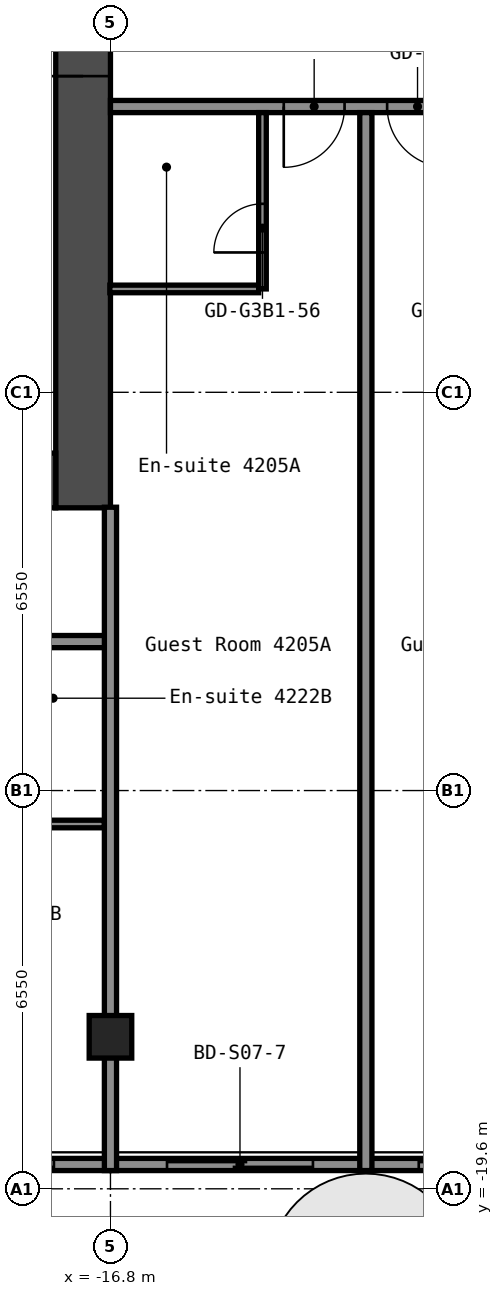
"""IFC4 building model, lengths in metres.
Left out: names, types, materials, properties, quantities, classifications, styles, units other than length and angle.
Written with IfcOpenShell. Run it as: python <this file> out.ifc"""

import sys

from ifc_helpers import new_model, si_unit, direction, frame, frame_2d, origin, origin_2d, place, context, subcontext, project, spatial, rectangle, hollow_rectangle, extrude, element, fill, save


model = new_model("IFC4")
c1 = context("Model", 3, precision=1e-05, world=origin(), true_north=direction((0.0, 1.0)))
c2 = subcontext(c1, "Body", "Model", "MODEL_VIEW")
j1 = project(units=[si_unit("LENGTHUNIT", "METRE"), si_unit("PLANEANGLEUNIT", "RADIAN")], contexts=[c1])
p1 = place(None, origin())
s1 = spatial("IfcSite", under=j1, at=p1, CompositionType="ELEMENT")
p2 = place(p1, origin())
s2 = spatial("IfcBuilding", under=s1, at=p2, CompositionType="ELEMENT")
p3 = place(p2, frame((0.0, 0.0, 150.2)))
s3 = spatial("IfcBuildingStorey", under=s2, at=p3, CompositionType="ELEMENT", Elevation=150.2)
p4 = place(p3, frame((-16.8, -17.1, 0.0), z_axis=(0.0, 0.0, 1.0), x_axis=(1.0, 0.0, 0.0)))
e1 = element("IfcColumn", 1, at=p4, inside=s3, PredefinedType="COLUMN", context=c2, shape_type="SweptSolid", body=[
    extrude(hollow_rectangle(XDim=0.7, YDim=0.7, WallThickness=0.028, at=origin_2d()), origin(), (0.0, 0.0, 1.0), 2.75),
])
p5 = place(p3, frame((-17.25, -8.4, 0.0), z_axis=(0.0, 0.0, 1.0), x_axis=(0.0, 1.0, 0.0)))
e2 = element("IfcWall", 2, at=p5, inside=s3, PredefinedType="SHEAR", context=c2, shape_type="SweptSolid", body=[
    extrude(rectangle(XDim=16.8, YDim=0.9, at=frame_2d((8.4, 0.0))), origin(), (0.0, 0.0, 1.0), 2.75),
])
p6 = place(p5, frame((7.1, 0.0, 0.0)))
e3 = element("IfcOpeningElement", 3, at=p6, cuts=e2, PredefinedType="OPENING", context=c2, shape_type="SweptSolid", body=[
    extrude(rectangle(XDim=1.6, YDim=2.1, at=frame_2d((0.8, 1.05))), frame((0.0, 0.46, 0.0), z_axis=(0.0, -1.0, 0.0), x_axis=(1.0, 0.0, 0.0)), (0.0, 0.0, 1.0), 0.92),
])
p7 = place(p3, frame((-32.7, -7.95, 0.0), z_axis=(0.0, 0.0, 1.0), x_axis=(1.0, 0.0, 0.0)))
e4 = element("IfcWall", 4, at=p7, inside=s3, PredefinedType="SHEAR", context=c2, shape_type="SweptSolid", body=[
    extrude(rectangle(XDim=15.0, YDim=0.9, at=frame_2d((7.5, 0.0))), origin(), (0.0, 0.0, 1.0), 2.75),
])
p8 = place(p7, frame((11.45, 0.0, 0.0)))
e5 = element("IfcOpeningElement", 5, at=p8, cuts=e4, PredefinedType="OPENING", context=c2, shape_type="SweptSolid", body=[
    extrude(rectangle(XDim=1.0, YDim=2.1, at=frame_2d((0.5, 1.05))), frame((0.0, 0.46, 0.0), z_axis=(0.0, -1.0, 0.0), x_axis=(1.0, 0.0, 0.0)), (0.0, 0.0, 1.0), 0.92),
])
p9 = place(p3, frame((-19.238, -13.6, 0.0), z_axis=(0.0, 0.0, 1.0), x_axis=(1.0, 0.0, 0.0)))
e6 = element("IfcWall", 6, at=p9, inside=s3, PredefinedType="PARTITIONING", context=c2, shape_type="SweptSolid", body=[
    extrude(rectangle(XDim=2.338, YDim=0.125, at=frame_2d((1.169, 0.0))), origin(), (0.0, 0.0, 1.0), 2.75),
])
p10 = place(p3, frame((-42.7, -10.6, 0.0), z_axis=(0.0, 0.0, 1.0), x_axis=(1.0, 0.0, 0.0)))
e7 = element("IfcWall", 7, at=p10, inside=s3, PredefinedType="PARTITIONING", context=c2, shape_type="SweptSolid", body=[
    extrude(rectangle(XDim=25.9, YDim=0.2, at=frame_2d((12.95, 0.0))), origin(), (0.0, 0.0, 1.0), 2.75),
])
p11 = place(p10, frame((3.25, 0.0, 0.0)))
e8 = element("IfcOpeningElement", 8, at=p11, cuts=e7, PredefinedType="OPENING", context=c2, shape_type="SweptSolid", body=[
    extrude(rectangle(XDim=1.0, YDim=2.1, at=frame_2d((0.5, 1.05))), frame((0.0, 0.11, 0.0), z_axis=(0.0, -1.0, 0.0), x_axis=(1.0, 0.0, 0.0)), (0.0, 0.0, 1.0), 0.22),
])
p12 = place(p10, frame((5.15, 0.0, 0.0)))
e9 = element("IfcOpeningElement", 9, at=p12, cuts=e7, PredefinedType="OPENING", context=c2, shape_type="SweptSolid", body=[
    extrude(rectangle(XDim=1.0, YDim=2.1, at=frame_2d((0.5, 1.05))), frame((0.0, 0.11, 0.0), z_axis=(0.0, -1.0, 0.0), x_axis=(1.0, 0.0, 0.0)), (0.0, 0.0, 1.0), 0.22),
])
p13 = place(p10, frame((11.95, 0.0, 0.0)))
e10 = element("IfcOpeningElement", 10, at=p13, cuts=e7, PredefinedType="OPENING", context=c2, shape_type="SweptSolid", body=[
    extrude(rectangle(XDim=1.0, YDim=2.1, at=frame_2d((0.5, 1.05))), frame((0.0, 0.11, 0.0), z_axis=(0.0, -1.0, 0.0), x_axis=(1.0, 0.0, 0.0)), (0.0, 0.0, 1.0), 0.22),
])
p14 = place(p10, frame((13.65, 0.0, 0.0)))
e11 = element("IfcOpeningElement", 11, at=p14, cuts=e7, PredefinedType="OPENING", context=c2, shape_type="SweptSolid", body=[
    extrude(rectangle(XDim=1.0, YDim=2.1, at=frame_2d((0.5, 1.05))), frame((0.0, 0.11, 0.0), z_axis=(0.0, -1.0, 0.0), x_axis=(1.0, 0.0, 0.0)), (0.0, 0.0, 1.0), 0.22),
])
p15 = place(p10, frame((20.35, 0.0, 0.0)))
e12 = element("IfcOpeningElement", 12, at=p15, cuts=e7, PredefinedType="OPENING", context=c2, shape_type="SweptSolid", body=[
    extrude(rectangle(XDim=1.0, YDim=2.1, at=frame_2d((0.5, 1.05))), frame((0.0, 0.11, 0.0), z_axis=(0.0, -1.0, 0.0), x_axis=(1.0, 0.0, 0.0)), (0.0, 0.0, 1.0), 0.22),
])
p16 = place(p10, frame((22.05, 0.0, 0.0)))
e13 = element("IfcOpeningElement", 13, at=p16, cuts=e7, PredefinedType="OPENING", context=c2, shape_type="SweptSolid", body=[
    extrude(rectangle(XDim=1.0, YDim=2.1, at=frame_2d((0.5, 1.05))), frame((0.0, 0.11, 0.0), z_axis=(0.0, -1.0, 0.0), x_axis=(1.0, 0.0, 0.0)), (0.0, 0.0, 1.0), 0.22),
])
p17 = place(p3, frame((-16.81, -4.8, 0.0), z_axis=(0.0, 0.0, 1.0), x_axis=(1.0, 0.0, 0.0)))
e14 = element("IfcWall", 14, at=p17, inside=s3, PredefinedType="PARTITIONING", context=c2, shape_type="SweptSolid", body=[
    extrude(rectangle(XDim=2.448, YDim=0.125, at=frame_2d((1.224, 0.0))), origin(), (0.0, 0.0, 1.0), 2.75),
])
p18 = place(p3, frame((-16.8, -1.8, 0.0), z_axis=(0.0, 0.0, 1.0), x_axis=(1.0, 0.0, 0.0)))
e15 = element("IfcWall", 15, at=p18, inside=s3, PredefinedType="PARTITIONING", context=c2, shape_type="SweptSolid", body=[
    extrude(rectangle(XDim=33.6, YDim=0.2, at=frame_2d((16.8, 0.0))), origin(), (0.0, 0.0, 1.0), 2.75),
])
p19 = place(p18, frame((2.85, 0.0, 0.0)))
e16 = element("IfcOpeningElement", 16, at=p19, cuts=e15, PredefinedType="OPENING", context=c2, shape_type="SweptSolid", body=[
    extrude(rectangle(XDim=1.0, YDim=2.1, at=frame_2d((0.5, 1.05))), frame((0.0, 0.11, 0.0), z_axis=(0.0, -1.0, 0.0), x_axis=(1.0, 0.0, 0.0)), (0.0, 0.0, 1.0), 0.22),
])
p20 = place(p18, frame((4.55, 0.0, 0.0)))
e17 = element("IfcOpeningElement", 17, at=p20, cuts=e15, PredefinedType="OPENING", context=c2, shape_type="SweptSolid", body=[
    extrude(rectangle(XDim=1.0, YDim=2.1, at=frame_2d((0.5, 1.05))), frame((0.0, 0.11, 0.0), z_axis=(0.0, -1.0, 0.0), x_axis=(1.0, 0.0, 0.0)), (0.0, 0.0, 1.0), 0.22),
])
p21 = place(p18, frame((10.3, 0.0, 0.0)))
e18 = element("IfcOpeningElement", 18, at=p21, cuts=e15, PredefinedType="OPENING", context=c2, shape_type="SweptSolid", body=[
    extrude(rectangle(XDim=1.0, YDim=2.1, at=frame_2d((0.5, 1.05))), frame((0.0, 0.11, 0.0), z_axis=(0.0, -1.0, 0.0), x_axis=(1.0, 0.0, 0.0)), (0.0, 0.0, 1.0), 0.22),
])
p22 = place(p18, frame((20.5, 0.0, 0.0)))
e19 = element("IfcOpeningElement", 19, at=p22, cuts=e15, PredefinedType="OPENING", context=c2, shape_type="SweptSolid", body=[
    extrude(rectangle(XDim=1.0, YDim=2.1, at=frame_2d((0.5, 1.05))), frame((0.0, 0.11, 0.0), z_axis=(0.0, -1.0, 0.0), x_axis=(1.0, 0.0, 0.0)), (0.0, 0.0, 1.0), 0.22),
])
p23 = place(p18, frame((28.05, 0.0, 0.0)))
e20 = element("IfcOpeningElement", 20, at=p23, cuts=e15, PredefinedType="OPENING", context=c2, shape_type="SweptSolid", body=[
    extrude(rectangle(XDim=1.0, YDim=2.1, at=frame_2d((0.5, 1.05))), frame((0.0, 0.11, 0.0), z_axis=(0.0, -1.0, 0.0), x_axis=(1.0, 0.0, 0.0)), (0.0, 0.0, 1.0), 0.22),
])
p24 = place(p18, frame((29.75, 0.0, 0.0)))
e21 = element("IfcOpeningElement", 21, at=p24, cuts=e15, PredefinedType="OPENING", context=c2, shape_type="SweptSolid", body=[
    extrude(rectangle(XDim=1.0, YDim=2.1, at=frame_2d((0.5, 1.05))), frame((0.0, 0.11, 0.0), z_axis=(0.0, -1.0, 0.0), x_axis=(1.0, 0.0, 0.0)), (0.0, 0.0, 1.0), 0.22),
])
p25 = place(p3, frame((-16.8, -19.3, 0.0), z_axis=(0.0, 0.0, 1.0), x_axis=(0.0, 1.0, 0.0)))
e22 = element("IfcWall", 22, at=p25, inside=s3, PredefinedType="PARTITIONING", context=c2, shape_type="SweptSolid", body=[
    extrude(rectangle(XDim=10.91, YDim=0.2, at=frame_2d((5.455, 0.0))), origin(), (0.0, 0.0, 1.0), 2.75),
])
p26 = place(p3, frame((-14.3, -4.8, 0.0), z_axis=(0.0, 0.0, 1.0), x_axis=(0.0, 1.0, 0.0)))
e23 = element("IfcWall", 23, at=p26, inside=s3, PredefinedType="PARTITIONING", context=c2, shape_type="SweptSolid", body=[
    extrude(rectangle(XDim=2.9, YDim=0.125, at=frame_2d((1.45, 0.0))), origin(), (0.0, 0.0, 1.0), 2.75),
])
p27 = place(p26, frame((0.6, 0.0, 0.0)))
e24 = element("IfcOpeningElement", 24, at=p27, cuts=e23, PredefinedType="OPENING", context=c2, shape_type="SweptSolid", body=[
    extrude(rectangle(XDim=0.8, YDim=2.1, at=frame_2d((0.4, 1.05))), frame((0.0, 0.073, 0.0), z_axis=(0.0, -1.0, 0.0), x_axis=(1.0, 0.0, 0.0)), (0.0, 0.0, 1.0), 0.145),
])
p28 = place(p3, frame((-12.6, -19.3, 0.0), z_axis=(0.0, 0.0, 1.0), x_axis=(0.0, 1.0, 0.0)))
e25 = element("IfcWall", 25, at=p28, inside=s3, PredefinedType="PARTITIONING", context=c2, shape_type="SweptSolid", body=[
    extrude(rectangle(XDim=17.4, YDim=0.2, at=frame_2d((8.7, 0.0))), origin(), (0.0, 0.0, 1.0), 2.75),
])
p29 = place(p3, frame((-21.04, -19.2, 0.0), z_axis=(0.0, 0.0, 1.0), x_axis=(1.0, 0.0, 0.0)))
p30 = place(p29, frame((0.91, 0.0, 0.0)))
p31 = place(p30, frame((2.4, 0.0, 0.0), z_axis=(0.0, 0.0, 1.0), x_axis=(-1.0, 0.0, 0.0)))
e26 = element("IfcDoor", 26, at=p31, inside=s3, OperationType="SLIDING_TO_LEFT", PredefinedType="DOOR", context=c2, shape_type="SweptSolid", body=[
    extrude(rectangle(XDim=2.4, YDim=2.2, at=frame_2d((1.2, 1.1))), frame((0.0, 0.025, 0.0), z_axis=(0.0, -1.0, 0.0), x_axis=(1.0, 0.0, 0.0)), (0.0, 0.0, 1.0), 0.05),
])
p32 = place(p3, frame((-16.78, -19.2, 0.0), z_axis=(0.0, 0.0, 1.0), x_axis=(1.0, 0.0, 0.0)))
p33 = place(p32, frame((0.91, 0.0, 0.0)))
p34 = place(p33, frame((2.4, 0.0, 0.0), z_axis=(0.0, 0.0, 1.0), x_axis=(-1.0, 0.0, 0.0)))
e27 = element("IfcDoor", 27, at=p34, inside=s3, OperationType="SLIDING_TO_LEFT", PredefinedType="DOOR", context=c2, shape_type="SweptSolid", body=[
    extrude(rectangle(XDim=2.4, YDim=2.2, at=frame_2d((1.2, 1.1))), frame((0.0, 0.025, 0.0), z_axis=(0.0, -1.0, 0.0), x_axis=(1.0, 0.0, 0.0)), (0.0, 0.0, 1.0), 0.05),
])
p35 = place(p3, frame((-12.64, -19.2, 0.0), z_axis=(0.0, 0.0, 1.0), x_axis=(1.0, 0.0, 0.0)))
p36 = place(p35, frame((0.91, 0.0, 0.0)))
p37 = place(p36, frame((2.4, 0.0, 0.0), z_axis=(0.0, 0.0, 1.0), x_axis=(-1.0, 0.0, 0.0)))
e28 = element("IfcDoor", 28, at=p37, inside=s3, OperationType="SLIDING_TO_LEFT", PredefinedType="DOOR", context=c2, shape_type="SweptSolid", body=[
    extrude(rectangle(XDim=2.4, YDim=2.2, at=frame_2d((1.2, 1.1))), frame((0.0, 0.025, 0.0), z_axis=(0.0, -1.0, 0.0), x_axis=(1.0, 0.0, 0.0)), (0.0, 0.0, 1.0), 0.05),
])
p38 = place(p6, origin())
e29 = element("IfcDoor", 29, at=p38, inside=s3, OperationType="DOUBLE_DOOR_SINGLE_SWING", PredefinedType="DOOR", context=c2, shape_type="SweptSolid", body=[
    extrude(rectangle(XDim=1.6, YDim=2.1, at=frame_2d((0.8, 1.05))), frame((0.0, 0.025, 0.0), z_axis=(0.0, -1.0, 0.0), x_axis=(1.0, 0.0, 0.0)), (0.0, 0.0, 1.0), 0.05),
])
fill(e3, e29)
p39 = place(p19, origin())
e30 = element("IfcDoor", 30, at=p39, inside=s3, OperationType="SINGLE_SWING_LEFT", PredefinedType="DOOR", context=c2, shape_type="SweptSolid", body=[
    extrude(rectangle(XDim=1.0, YDim=2.1, at=frame_2d((0.5, 1.05))), frame((0.0, 0.025, 0.0), z_axis=(0.0, -1.0, 0.0), x_axis=(1.0, 0.0, 0.0)), (0.0, 0.0, 1.0), 0.05),
])
fill(e16, e30)
p40 = place(p20, origin())
e31 = element("IfcDoor", 31, at=p40, inside=s3, OperationType="SINGLE_SWING_RIGHT", PredefinedType="DOOR", context=c2, shape_type="SweptSolid", body=[
    extrude(rectangle(XDim=1.0, YDim=2.1, at=frame_2d((0.5, 1.05))), frame((0.0, 0.025, 0.0), z_axis=(0.0, -1.0, 0.0), x_axis=(1.0, 0.0, 0.0)), (0.0, 0.0, 1.0), 0.05),
])
fill(e17, e31)
p41 = place(p27, origin())
e32 = element("IfcDoor", 32, at=p41, inside=s3, OperationType="SINGLE_SWING_RIGHT", PredefinedType="DOOR", context=c2, shape_type="SweptSolid", body=[
    extrude(rectangle(XDim=0.8, YDim=2.1, at=frame_2d((0.4, 1.05))), frame((0.0, 0.025, 0.0), z_axis=(0.0, -1.0, 0.0), x_axis=(1.0, 0.0, 0.0)), (0.0, 0.0, 1.0), 0.05),
])
fill(e24, e32)
save(model, sys.argv[1])
